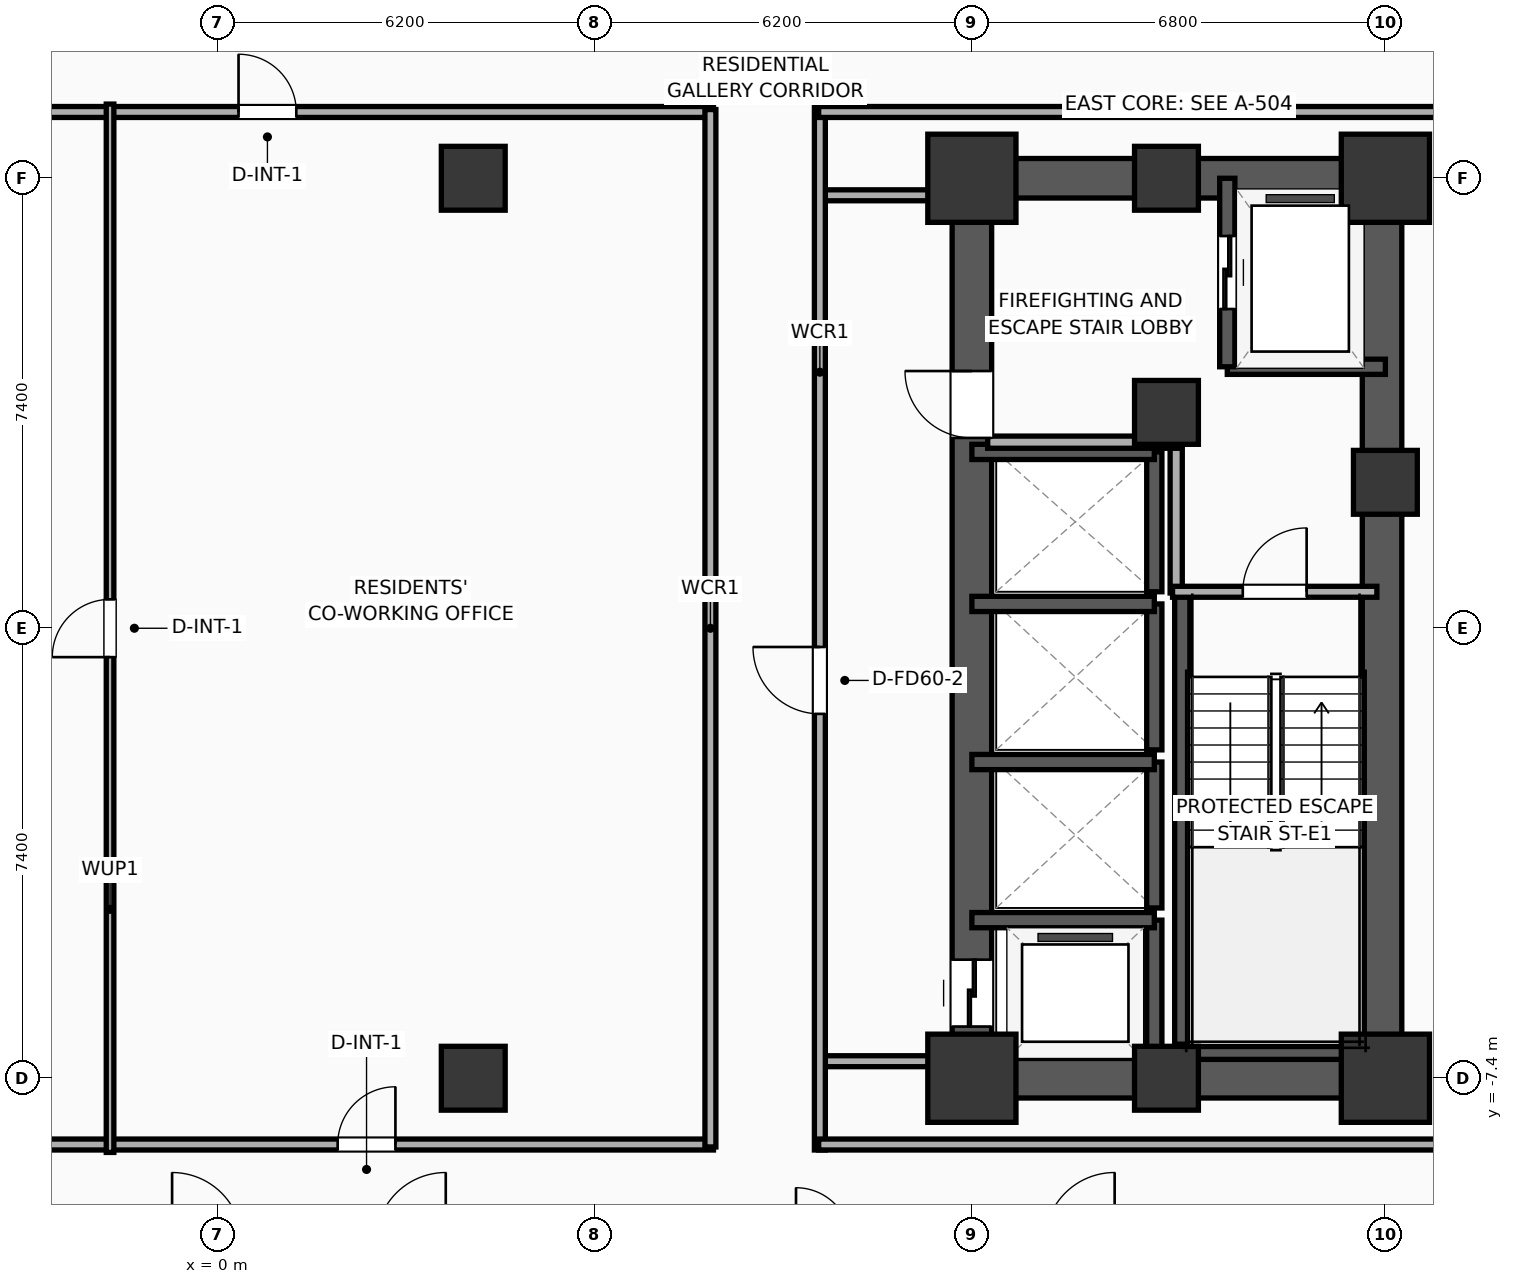
"""IFC4 building model, lengths in metres.
Left out: names, types, materials, properties, quantities, classifications, styles, units other than length and angle.
Written with IfcOpenShell. Run it as: python <this file> out.ifc"""

import sys

from ifc_helpers import new_model, si_unit, direction, frame, frame_2d, origin, origin_2d, place, context, subcontext, project, spatial, rectangle, extrude, element, fill, save


model = new_model("IFC4")
c1 = context("Model", 3, precision=1e-05, world=origin(), true_north=direction((0.0, 1.0)))
c2 = subcontext(c1, "Body", "Model", "MODEL_VIEW")
j1 = project(units=[si_unit("LENGTHUNIT", "METRE"), si_unit("PLANEANGLEUNIT", "RADIAN")], contexts=[c1])
p1 = place(None, origin())
s1 = spatial("IfcSite", under=j1, at=p1, CompositionType="ELEMENT")
p2 = place(p1, origin())
s2 = spatial("IfcBuilding", under=s1, at=p2, CompositionType="ELEMENT")
p3 = place(p2, frame((0.0, 0.0, 68.9)))
s3 = spatial("IfcBuildingStorey", under=s2, at=p3, CompositionType="ELEMENT", Elevation=68.9)
p4 = place(p3, frame((12.4, -7.4, 0.0), z_axis=(0.0, 0.0, 1.0), x_axis=(1.0, 0.0, 0.0)))
e1 = element("IfcColumn", 1, at=p4, inside=s3, PredefinedType="COLUMN", context=c2, shape_type="SweptSolid", body=[
    extrude(rectangle(XDim=1.45, YDim=1.45, at=origin_2d()), origin(), (0.0, 0.0, 1.0), 3.9),
])
p5 = place(p3, frame((15.6, 3.55, 0.0), z_axis=(0.0, 0.0, 1.0), x_axis=(1.0, 0.0, 0.0)))
e2 = element("IfcColumn", 2, at=p5, inside=s3, PredefinedType="COLUMN", context=c2, shape_type="SweptSolid", body=[
    extrude(rectangle(XDim=1.05, YDim=1.05, at=origin_2d()), origin(), (0.0, 0.0, 1.0), 3.9),
])
p6 = place(p3, frame((12.4, 7.4, 0.0), z_axis=(0.0, 0.0, 1.0), x_axis=(1.0, 0.0, 0.0)))
e3 = element("IfcColumn", 3, at=p6, inside=s3, PredefinedType="COLUMN", context=c2, shape_type="SweptSolid", body=[
    extrude(rectangle(XDim=1.45, YDim=1.45, at=origin_2d()), origin(), (0.0, 0.0, 1.0), 3.9),
])
for number, where, z_axis, x_axis in (
    (4, (15.6, -7.4, 0.0), (0.0, 0.0, 1.0), (1.0, 0.0, 0.0)),
    (5, (15.6, 7.4, 0.0), (0.0, 0.0, 1.0), (1.0, 0.0, 0.0)),
):
    element("IfcColumn", number, at=place(p3, frame(where, z_axis=z_axis, x_axis=x_axis)), inside=s3, PredefinedType="COLUMN", context=c2, shape_type="SweptSolid", body=[
        extrude(rectangle(XDim=1.05, YDim=1.05, at=origin_2d()), origin(), (0.0, 0.0, 1.0), 3.9),
    ])
p7 = place(p3, frame((19.2, -7.4, 0.0), z_axis=(0.0, 0.0, 1.0), x_axis=(1.0, 0.0, 0.0)))
e6 = element("IfcColumn", 6, at=p7, inside=s3, PredefinedType="COLUMN", context=c2, shape_type="SweptSolid", body=[
    extrude(rectangle(XDim=1.45, YDim=1.45, at=origin_2d()), origin(), (0.0, 0.0, 1.0), 3.9),
])
p8 = place(p3, frame((19.2, 2.4, 0.0), z_axis=(0.0, 0.0, 1.0), x_axis=(1.0, 0.0, 0.0)))
e7 = element("IfcColumn", 7, at=p8, inside=s3, PredefinedType="COLUMN", context=c2, shape_type="SweptSolid", body=[
    extrude(rectangle(XDim=1.05, YDim=1.05, at=origin_2d()), origin(), (0.0, 0.0, 1.0), 3.9),
])
p9 = place(p3, frame((19.2, 7.4, 0.0), z_axis=(0.0, 0.0, 1.0), x_axis=(1.0, 0.0, 0.0)))
e8 = element("IfcColumn", 8, at=p9, inside=s3, PredefinedType="COLUMN", context=c2, shape_type="SweptSolid", body=[
    extrude(rectangle(XDim=1.45, YDim=1.45, at=origin_2d()), origin(), (0.0, 0.0, 1.0), 3.9),
])
for number, where, z_axis, x_axis in (
    (9, (12.075, -7.4, 0.0), (0.0, 0.0, 1.0), (1.0, 0.0, 0.0)),
    (10, (12.075, 7.4, 0.0), (0.0, 0.0, 1.0), (1.0, 0.0, 0.0)),
):
    element("IfcWall", number, at=place(p3, frame(where, z_axis=z_axis, x_axis=x_axis)), inside=s3, PredefinedType="SHEAR", context=c2, shape_type="SweptSolid", body=[
        extrude(rectangle(XDim=7.45, YDim=0.65, at=frame_2d((3.725, 0.0))), origin(), (0.0, 0.0, 1.0), 3.65),
    ])
p10 = place(p3, frame((12.4, -7.4, 0.0), z_axis=(0.0, 0.0, 1.0), x_axis=(0.0, 1.0, 0.0)))
e11 = element("IfcWall", 11, at=p10, inside=s3, PredefinedType="SHEAR", context=c2, shape_type="SweptSolid", body=[
    extrude(rectangle(XDim=14.8, YDim=0.65, at=frame_2d((7.4, 0.0))), origin(), (0.0, 0.0, 1.0), 3.65),
])
p11 = place(p10, frame((0.85, 0.0, 0.0)))
e12 = element("IfcOpeningElement", 12, at=p11, cuts=e11, PredefinedType="OPENING", context=c2, shape_type="SweptSolid", body=[
    extrude(rectangle(XDim=1.1, YDim=2.05, at=frame_2d((0.55, 1.025))), frame((0.0, 0.335, 0.0), z_axis=(0.0, -1.0, 0.0), x_axis=(1.0, 0.0, 0.0)), (0.0, 0.0, 1.0), 0.67),
])
p12 = place(p10, frame((10.53, 0.0, 0.0)))
e13 = element("IfcOpeningElement", 13, at=p12, cuts=e11, PredefinedType="OPENING", context=c2, shape_type="SweptSolid", body=[
    extrude(rectangle(XDim=1.1, YDim=2.05, at=frame_2d((0.55, 1.025))), frame((0.0, 0.335, 0.0), z_axis=(0.0, -1.0, 0.0), x_axis=(1.0, 0.0, 0.0)), (0.0, 0.0, 1.0), 0.67),
])
p13 = place(p3, frame((19.145, -7.4, 0.0), z_axis=(0.0, 0.0, 1.0), x_axis=(0.0, 1.0, 0.0)))
e14 = element("IfcWall", 14, at=p13, inside=s3, PredefinedType="SHEAR", context=c2, shape_type="SweptSolid", body=[
    extrude(rectangle(XDim=14.8, YDim=0.65, at=frame_2d((7.4, 0.0))), origin(), (0.0, 0.0, 1.0), 3.65),
])
p14 = place(p3, frame((15.86, -7.085, 0.0), z_axis=(0.0, 0.0, 1.0), x_axis=(0.0, 1.0, 0.0)))
e15 = element("IfcWall", 15, at=p14, inside=s3, PredefinedType="SOLIDWALL", context=c2, shape_type="SweptSolid", body=[
    extrude(rectangle(XDim=7.685, YDim=0.25, at=frame_2d((3.843, 0.0))), origin(), (0.0, 0.0, 1.0), 3.65),
])
p15 = place(p3, frame((15.74, -6.965, 0.0), z_axis=(0.0, 0.0, 1.0), x_axis=(1.0, 0.0, 0.0)))
e16 = element("IfcWall", 16, at=p15, inside=s3, PredefinedType="SOLIDWALL", context=c2, shape_type="SweptSolid", body=[
    extrude(rectangle(XDim=3.46, YDim=0.25, at=frame_2d((1.73, 0.0))), origin(), (0.0, 0.0, 1.0), 3.65),
])
for number, where, z_axis, x_axis in (
    (17, (4.2, -7.4, 0.0), (0.0, 0.0, 1.0), (1.0, 0.0, 0.0)),
    (18, (4.2, 7.4, 0.0), (0.0, 0.0, 1.0), (1.0, 0.0, 0.0)),
):
    element("IfcColumn", number, at=place(p3, frame(where, z_axis=z_axis, x_axis=x_axis)), inside=s3, PredefinedType="COLUMN", context=c2, shape_type="SweptSolid", body=[
        extrude(rectangle(XDim=1.05, YDim=1.05, at=origin_2d()), origin(), (0.0, 0.0, 1.0), 3.9),
    ])
p16 = place(p3, frame((16.6, 4.3, 0.0), z_axis=(0.0, 0.0, 1.0), x_axis=(1.0, 0.0, 0.0)))
e19 = element("IfcWall", 19, at=p16, inside=s3, PredefinedType="SOLIDWALL", context=c2, shape_type="SweptSolid", body=[
    extrude(rectangle(XDim=2.6, YDim=0.25, at=frame_2d((1.3, 0.0))), origin(), (0.0, 0.0, 1.0), 3.65),
])
p17 = place(p3, frame((16.6, 7.4, 0.0), z_axis=(0.0, 0.0, 1.0), x_axis=(0.0, -1.0, 0.0)))
e20 = element("IfcWall", 20, at=p17, inside=s3, PredefinedType="SOLIDWALL", context=c2, shape_type="SweptSolid", body=[
    extrude(rectangle(XDim=3.1, YDim=0.25, at=frame_2d((1.55, 0.0))), origin(), (0.0, 0.0, 1.0), 3.65),
])
p18 = place(p17, frame((0.95, 0.0, 0.0)))
e21 = element("IfcOpeningElement", 21, at=p18, cuts=e20, PredefinedType="OPENING", context=c2, shape_type="SweptSolid", body=[
    extrude(rectangle(XDim=1.2, YDim=2.05, at=frame_2d((0.6, 1.025))), frame((0.0, 0.135, 0.0), z_axis=(0.0, -1.0, 0.0), x_axis=(1.0, 0.0, 0.0)), (0.0, 0.0, 1.0), 0.27),
])
p19 = place(p3, frame((15.4, -7.4, 0.0), z_axis=(0.0, 0.0, 1.0), x_axis=(0.0, 1.0, 0.0)))
e22 = element("IfcWall", 22, at=p19, inside=s3, PredefinedType="SOLIDWALL", context=c2, shape_type="SweptSolid", body=[
    extrude(rectangle(XDim=2.6, YDim=0.25, at=frame_2d((1.3, 0.0))), origin(), (0.0, 0.0, 1.0), 3.65),
])
p20 = place(p3, frame((15.4, -4.8, 0.0), z_axis=(0.0, 0.0, 1.0), x_axis=(-1.0, 0.0, 0.0)))
e23 = element("IfcWall", 23, at=p20, inside=s3, PredefinedType="SOLIDWALL", context=c2, shape_type="SweptSolid", body=[
    extrude(rectangle(XDim=3.0, YDim=0.25, at=frame_2d((1.5, 0.0))), origin(), (0.0, 0.0, 1.0), 3.65),
])
p21 = place(p3, frame((15.4, -4.6, 0.0), z_axis=(0.0, 0.0, 1.0), x_axis=(0.0, 1.0, 0.0)))
e24 = element("IfcWall", 24, at=p21, inside=s3, PredefinedType="SOLIDWALL", context=c2, shape_type="SweptSolid", body=[
    extrude(rectangle(XDim=2.4, YDim=0.25, at=frame_2d((1.2, 0.0))), origin(), (0.0, 0.0, 1.0), 3.65),
])
p22 = place(p3, frame((15.4, -2.2, 0.0), z_axis=(0.0, 0.0, 1.0), x_axis=(-1.0, 0.0, 0.0)))
e25 = element("IfcWall", 25, at=p22, inside=s3, PredefinedType="SOLIDWALL", context=c2, shape_type="SweptSolid", body=[
    extrude(rectangle(XDim=3.0, YDim=0.25, at=frame_2d((1.5, 0.0))), origin(), (0.0, 0.0, 1.0), 3.65),
])
p23 = place(p3, frame((15.4, -2.0, 0.0), z_axis=(0.0, 0.0, 1.0), x_axis=(0.0, 1.0, 0.0)))
e26 = element("IfcWall", 26, at=p23, inside=s3, PredefinedType="SOLIDWALL", context=c2, shape_type="SweptSolid", body=[
    extrude(rectangle(XDim=2.4, YDim=0.25, at=frame_2d((1.2, 0.0))), origin(), (0.0, 0.0, 1.0), 3.65),
])
p24 = place(p3, frame((15.4, 0.4, 0.0), z_axis=(0.0, 0.0, 1.0), x_axis=(-1.0, 0.0, 0.0)))
e27 = element("IfcWall", 27, at=p24, inside=s3, PredefinedType="SOLIDWALL", context=c2, shape_type="SweptSolid", body=[
    extrude(rectangle(XDim=3.0, YDim=0.25, at=frame_2d((1.5, 0.0))), origin(), (0.0, 0.0, 1.0), 3.65),
])
p25 = place(p3, frame((15.4, 0.6, 0.0), z_axis=(0.0, 0.0, 1.0), x_axis=(0.0, 1.0, 0.0)))
e28 = element("IfcWall", 28, at=p25, inside=s3, PredefinedType="SOLIDWALL", context=c2, shape_type="SweptSolid", body=[
    extrude(rectangle(XDim=2.3, YDim=0.25, at=frame_2d((1.15, 0.0))), origin(), (0.0, 0.0, 1.0), 3.65),
])
p26 = place(p3, frame((15.4, 2.9, 0.0), z_axis=(0.0, 0.0, 1.0), x_axis=(-1.0, 0.0, 0.0)))
e29 = element("IfcWall", 29, at=p26, inside=s3, PredefinedType="SOLIDWALL", context=c2, shape_type="SweptSolid", body=[
    extrude(rectangle(XDim=3.0, YDim=0.25, at=frame_2d((1.5, 0.0))), origin(), (0.0, 0.0, 1.0), 3.65),
])
p27 = place(p3, frame((15.76, 0.58, 0.0), z_axis=(0.0, 0.0, 1.0), x_axis=(0.0, 1.0, 0.0)))
e30 = element("IfcWall", 30, at=p27, inside=s3, PredefinedType="PARTITIONING", context=c2, shape_type="SweptSolid", body=[
    extrude(rectangle(XDim=2.52, YDim=0.2, at=frame_2d((1.26, 0.0))), origin(), (0.0, 0.0, 1.0), 3.65),
])
p28 = place(p3, frame((12.66, 3.06, 0.0), z_axis=(0.0, 0.0, 1.0), x_axis=(1.0, 0.0, 0.0)))
e31 = element("IfcWall", 31, at=p28, inside=s3, PredefinedType="PARTITIONING", context=c2, shape_type="SweptSolid", body=[
    extrude(rectangle(XDim=3.16, YDim=0.2, at=frame_2d((1.58, 0.0))), origin(), (0.0, 0.0, 1.0), 3.65),
])
p29 = place(p3, frame((15.7, 0.6, 0.0), z_axis=(0.0, 0.0, 1.0), x_axis=(1.0, 0.0, 0.0)))
e32 = element("IfcWall", 32, at=p29, inside=s3, PredefinedType="PARTITIONING", context=c2, shape_type="SweptSolid", body=[
    extrude(rectangle(XDim=3.36, YDim=0.18, at=frame_2d((1.68, 0.0))), origin(), (0.0, 0.0, 1.0), 3.65),
])
p30 = place(p29, frame((1.155, 0.0, 0.0)))
e33 = element("IfcOpeningElement", 33, at=p30, cuts=e32, PredefinedType="OPENING", context=c2, shape_type="SweptSolid", body=[
    extrude(rectangle(XDim=1.05, YDim=2.05, at=frame_2d((0.525, 1.025))), frame((0.0, 0.1, 0.0), z_axis=(0.0, -1.0, 0.0), x_axis=(1.0, 0.0, 0.0)), (0.0, 0.0, 1.0), 0.2),
])
for number, where, z_axis, x_axis in (
    (34, (9.88, 7.12, 0.0), (0.0, 0.0, 1.0), (1.0, 0.0, 0.0)),
    (35, (9.88, -7.12, 0.0), (0.0, 0.0, 1.0), (1.0, 0.0, 0.0)),
):
    element("IfcWall", number, at=place(p3, frame(where, z_axis=z_axis, x_axis=x_axis)), inside=s3, PredefinedType="PARTITIONING", context=c2, shape_type="SweptSolid", body=[
        extrude(rectangle(XDim=2.27, YDim=0.18, at=frame_2d((1.135, 0.0))), origin(), (0.0, 0.0, 1.0), 2.94),
    ])
p31 = place(p3, frame((9.9, -8.58, 0.0), z_axis=(0.0, 0.0, 1.0), x_axis=(0.0, 1.0, 0.0)))
e36 = element("IfcWall", 36, at=p31, inside=s3, PredefinedType="PARTITIONING", context=c2, shape_type="SweptSolid", body=[
    extrude(rectangle(XDim=17.16, YDim=0.18, at=frame_2d((8.58, 0.0))), origin(), (0.0, 0.0, 1.0), 3.65),
])
p32 = place(p31, frame((7.172, 0.0, 0.0)))
e37 = element("IfcOpeningElement", 37, at=p32, cuts=e36, PredefinedType="OPENING", context=c2, shape_type="SweptSolid", body=[
    extrude(rectangle(XDim=1.1, YDim=2.05, at=frame_2d((0.55, 1.025))), frame((0.0, 0.1, 0.0), z_axis=(0.0, -1.0, 0.0), x_axis=(1.0, 0.0, 0.0)), (0.0, 0.0, 1.0), 0.2),
])
p33 = place(p3, frame((9.88, 8.49, 0.0), z_axis=(0.0, 0.0, 1.0), x_axis=(1.0, 0.0, 0.0)))
e38 = element("IfcWall", 38, at=p33, inside=s3, PredefinedType="PARTITIONING", context=c2, shape_type="SweptSolid", body=[
    extrude(rectangle(XDim=16.33, YDim=0.18, at=frame_2d((8.165, 0.0))), origin(), (0.0, 0.0, 1.0), 3.65),
])
p34 = place(p33, frame((14.365, 0.0, 0.0)))
e39 = element("IfcOpeningElement", 39, at=p34, cuts=e38, PredefinedType="OPENING", context=c2, shape_type="SweptSolid", body=[
    extrude(rectangle(XDim=0.9, YDim=2.05, at=frame_2d((0.45, 1.025))), frame((0.0, 0.1, 0.0), z_axis=(0.0, -1.0, 0.0), x_axis=(1.0, 0.0, 0.0)), (0.0, 0.0, 1.0), 0.2),
])
p35 = place(p3, frame((9.88, -8.49, 0.0), z_axis=(0.0, 0.0, 1.0), x_axis=(1.0, 0.0, 0.0)))
e40 = element("IfcWall", 40, at=p35, inside=s3, PredefinedType="PARTITIONING", context=c2, shape_type="SweptSolid", body=[
    extrude(rectangle(XDim=16.33, YDim=0.18, at=frame_2d((8.165, 0.0))), origin(), (0.0, 0.0, 1.0), 3.65),
])
p36 = place(p3, frame((-8.15, 8.49, 0.0), z_axis=(0.0, 0.0, 1.0), x_axis=(1.0, 0.0, 0.0)))
e41 = element("IfcWall", 41, at=p36, inside=s3, PredefinedType="PARTITIONING", context=c2, shape_type="SweptSolid", body=[
    extrude(rectangle(XDim=16.3, YDim=0.18, at=frame_2d((8.15, 0.0))), origin(), (0.0, 0.0, 1.0), 3.65),
])
p37 = place(p36, frame((8.49, 0.0, 0.0)))
e42 = element("IfcOpeningElement", 42, at=p37, cuts=e41, PredefinedType="OPENING", context=c2, shape_type="SweptSolid", body=[
    extrude(rectangle(XDim=0.95, YDim=2.05, at=frame_2d((0.475, 1.025))), frame((0.0, 0.1, 0.0), z_axis=(0.0, -1.0, 0.0), x_axis=(1.0, 0.0, 0.0)), (0.0, 0.0, 1.0), 0.2),
])
p38 = place(p3, frame((-8.15, -8.49, 0.0), z_axis=(0.0, 0.0, 1.0), x_axis=(1.0, 0.0, 0.0)))
e43 = element("IfcWall", 43, at=p38, inside=s3, PredefinedType="PARTITIONING", context=c2, shape_type="SweptSolid", body=[
    extrude(rectangle(XDim=16.3, YDim=0.18, at=frame_2d((8.15, 0.0))), origin(), (0.0, 0.0, 1.0), 3.65),
])
p39 = place(p38, frame((1.13, 0.0, 0.0)))
e44 = element("IfcOpeningElement", 44, at=p39, cuts=e43, PredefinedType="OPENING", context=c2, shape_type="SweptSolid", body=[
    extrude(rectangle(XDim=1.0, YDim=2.05, at=frame_2d((0.5, 1.025))), frame((0.0, 0.1, 0.0), z_axis=(0.0, -1.0, 0.0), x_axis=(1.0, 0.0, 0.0)), (0.0, 0.0, 1.0), 0.2),
])
p40 = place(p38, frame((10.12, 0.0, 0.0)))
e45 = element("IfcOpeningElement", 45, at=p40, cuts=e43, PredefinedType="OPENING", context=c2, shape_type="SweptSolid", body=[
    extrude(rectangle(XDim=0.95, YDim=2.05, at=frame_2d((0.475, 1.025))), frame((0.0, 0.1, 0.0), z_axis=(0.0, -1.0, 0.0), x_axis=(1.0, 0.0, 0.0)), (0.0, 0.0, 1.0), 0.2),
])
p41 = place(p3, frame((8.1, -8.53, 0.0), z_axis=(0.0, 0.0, 1.0), x_axis=(0.0, 1.0, 0.0)))
e46 = element("IfcWall", 46, at=p41, inside=s3, PredefinedType="PARTITIONING", context=c2, shape_type="SweptSolid", body=[
    extrude(rectangle(XDim=17.06, YDim=0.18, at=frame_2d((8.53, 0.0))), origin(), (0.0, 0.0, 1.0), 3.65),
])
p42 = place(p3, frame((-1.773, -8.62, 0.0), z_axis=(0.0, 0.0, 1.0), x_axis=(0.0, 1.0, 0.0)))
e47 = element("IfcWall", 47, at=p42, inside=s3, PredefinedType="PARTITIONING", context=c2, shape_type="SweptSolid", body=[
    extrude(rectangle(XDim=17.24, YDim=0.125, at=frame_2d((8.62, 0.0))), origin(), (0.0, 0.0, 1.0), 3.65),
])
p43 = place(p42, frame((8.145, 0.0, 0.0)))
e48 = element("IfcOpeningElement", 48, at=p43, cuts=e47, PredefinedType="OPENING", context=c2, shape_type="SweptSolid", body=[
    extrude(rectangle(XDim=0.95, YDim=2.05, at=frame_2d((0.475, 1.025))), frame((0.0, 0.073, 0.0), z_axis=(0.0, -1.0, 0.0), x_axis=(1.0, 0.0, 0.0)), (0.0, 0.0, 1.0), 0.145),
])
p44 = place(p18, origin())
e49 = element("IfcDoor", 49, at=p44, inside=s3, OperationType="SLIDING_TO_LEFT", PredefinedType="DOOR", context=c2, shape_type="SweptSolid", body=[
    extrude(rectangle(XDim=1.2, YDim=2.05, at=frame_2d((0.6, 1.025))), frame((0.0, 0.025, 0.0), z_axis=(0.0, -1.0, 0.0), x_axis=(1.0, 0.0, 0.0)), (0.0, 0.0, 1.0), 0.05),
])
fill(e21, e49)
p45 = place(p11, origin())
e50 = element("IfcDoor", 50, at=p45, inside=s3, OperationType="SLIDING_TO_LEFT", PredefinedType="DOOR", context=c2, shape_type="SweptSolid", body=[
    extrude(rectangle(XDim=1.1, YDim=2.05, at=frame_2d((0.55, 1.025))), frame((0.0, 0.025, 0.0), z_axis=(0.0, -1.0, 0.0), x_axis=(1.0, 0.0, 0.0)), (0.0, 0.0, 1.0), 0.05),
])
fill(e12, e50)
p46 = place(p30, origin())
e51 = element("IfcDoor", 51, at=p46, inside=s3, OperationType="SINGLE_SWING_RIGHT", PredefinedType="DOOR", context=c2, shape_type="SweptSolid", body=[
    extrude(rectangle(XDim=1.05, YDim=2.05, at=frame_2d((0.525, 1.025))), frame((0.0, 0.025, 0.0), z_axis=(0.0, -1.0, 0.0), x_axis=(1.0, 0.0, 0.0)), (0.0, 0.0, 1.0), 0.05),
])
fill(e33, e51)
p47 = place(p32, origin())
e52 = element("IfcDoor", 52, at=p47, inside=s3, OperationType="SINGLE_SWING_RIGHT", PredefinedType="DOOR", context=c2, shape_type="SweptSolid", body=[
    extrude(rectangle(XDim=1.1, YDim=2.05, at=frame_2d((0.55, 1.025))), frame((0.0, 0.025, 0.0), z_axis=(0.0, -1.0, 0.0), x_axis=(1.0, 0.0, 0.0)), (0.0, 0.0, 1.0), 0.05),
])
fill(e37, e52)
p48 = place(p37, origin())
e53 = element("IfcDoor", 53, at=p48, inside=s3, OperationType="SINGLE_SWING_LEFT", PredefinedType="DOOR", context=c2, shape_type="SweptSolid", body=[
    extrude(rectangle(XDim=0.95, YDim=2.05, at=frame_2d((0.475, 1.025))), frame((0.0, 0.025, 0.0), z_axis=(0.0, -1.0, 0.0), x_axis=(1.0, 0.0, 0.0)), (0.0, 0.0, 1.0), 0.05),
])
fill(e42, e53)
p49 = place(p40, origin())
e54 = element("IfcDoor", 54, at=p49, inside=s3, OperationType="SINGLE_SWING_RIGHT", PredefinedType="DOOR", context=c2, shape_type="SweptSolid", body=[
    extrude(rectangle(XDim=0.95, YDim=2.05, at=frame_2d((0.475, 1.025))), frame((0.0, 0.025, 0.0), z_axis=(0.0, -1.0, 0.0), x_axis=(1.0, 0.0, 0.0)), (0.0, 0.0, 1.0), 0.05),
])
fill(e45, e54)
p50 = place(p43, origin())
e55 = element("IfcDoor", 55, at=p50, inside=s3, OperationType="SINGLE_SWING_LEFT", PredefinedType="DOOR", context=c2, shape_type="SweptSolid", body=[
    extrude(rectangle(XDim=0.95, YDim=2.05, at=frame_2d((0.475, 1.025))), frame((0.0, 0.025, 0.0), z_axis=(0.0, -1.0, 0.0), x_axis=(1.0, 0.0, 0.0)), (0.0, 0.0, 1.0), 0.05),
])
fill(e48, e55)
p51 = place(p12, origin())
e56 = element("IfcDoor", 56, at=p51, inside=s3, OperationType="SINGLE_SWING_RIGHT", PredefinedType="DOOR", context=c2, shape_type="SweptSolid", body=[
    extrude(rectangle(XDim=1.1, YDim=2.05, at=frame_2d((0.55, 1.025))), frame((0.0, 0.025, 0.0), z_axis=(0.0, -1.0, 0.0), x_axis=(1.0, 0.0, 0.0)), (0.0, 0.0, 1.0), 0.05),
])
fill(e13, e56)
save(model, sys.argv[1])
